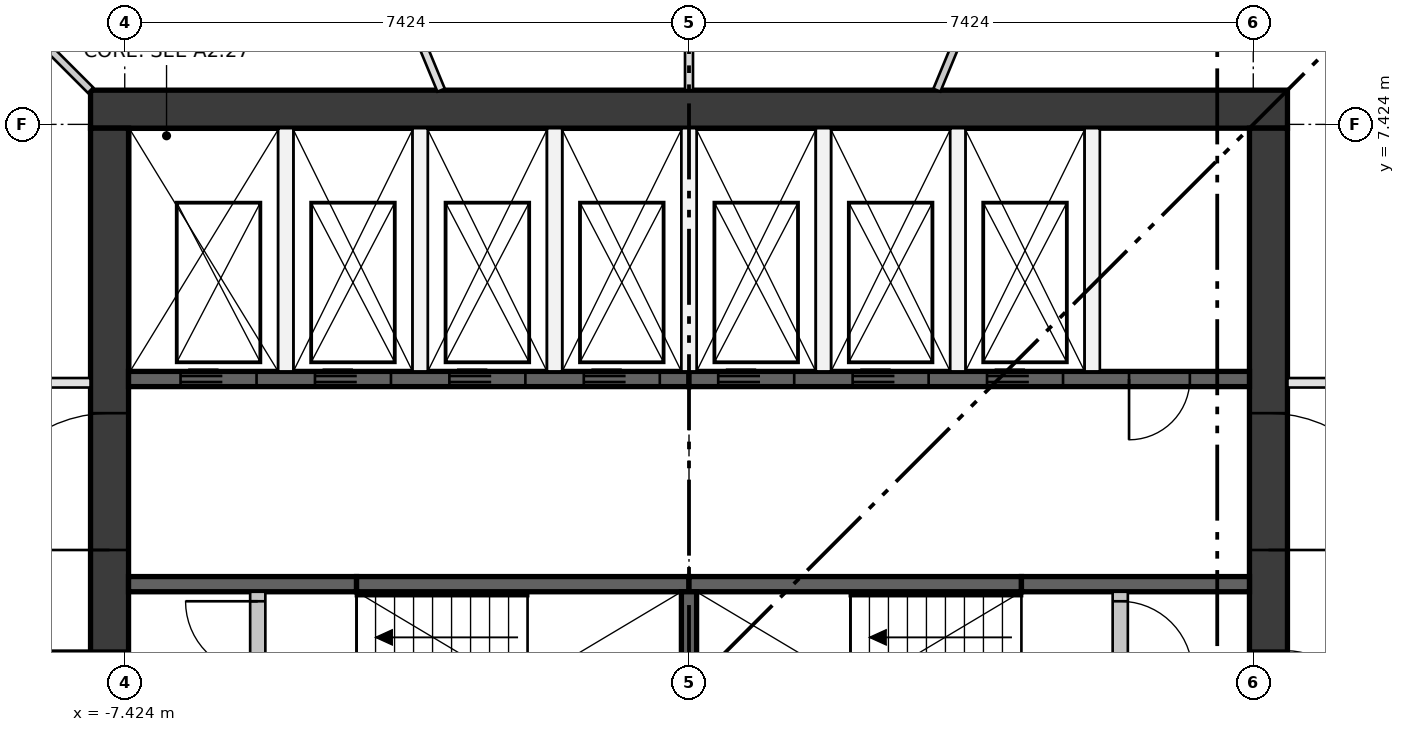
"""IFC4 building model, lengths in metres.
Left out: names, types, materials, properties, quantities, classifications, styles, units other than length and angle.
Written with IfcOpenShell. Run it as: python <this file> out.ifc"""

import sys

from ifc_helpers import new_model, si_unit, direction, frame, frame_2d, origin, place, context, subcontext, project, spatial, rectangle, extrude, element, fill, save


model = new_model("IFC4")
c1 = context("Model", 3, precision=1e-05, world=origin(), true_north=direction((0.0, 1.0)))
c2 = subcontext(c1, "Body", "Model", "MODEL_VIEW")
j1 = project(units=[si_unit("LENGTHUNIT", "METRE"), si_unit("PLANEANGLEUNIT", "RADIAN")], contexts=[c1])
p1 = place(None, origin())
s1 = spatial("IfcSite", under=j1, at=p1, CompositionType="ELEMENT")
p2 = place(p1, origin())
s2 = spatial("IfcBuilding", under=s1, at=p2, CompositionType="ELEMENT")
p3 = place(p2, frame((0.0, 0.0, 170.9)))
s3 = spatial("IfcBuildingStorey", under=s2, at=p3, CompositionType="ELEMENT", Elevation=170.9)
p4 = place(p3, frame((-7.874, 7.624, 0.0), z_axis=(0.0, 0.0, 1.0), x_axis=(1.0, 0.0, 0.0)))
e1 = element("IfcWall", 1, at=p4, inside=s3, PredefinedType="SHEAR", context=c2, shape_type="SweptSolid", body=[
    extrude(rectangle(XDim=15.748, YDim=0.5, at=frame_2d((7.874, 0.0))), origin(), (0.0, 0.0, 1.0), 3.35),
])
p5 = place(p3, frame((-7.624, -7.374, 0.0), z_axis=(0.0, 0.0, 1.0), x_axis=(0.0, 1.0, 0.0)))
e2 = element("IfcWall", 2, at=p5, inside=s3, PredefinedType="SHEAR", context=c2, shape_type="SweptSolid", body=[
    extrude(rectangle(XDim=14.748, YDim=0.5, at=frame_2d((7.374, 0.0))), origin(), (0.0, 0.0, 1.0), 3.35),
])
p6 = place(p5, frame((6.874, 0.0, 0.0)))
e3 = element("IfcOpeningElement", 3, at=p6, cuts=e2, PredefinedType="OPENING", context=c2, shape_type="SweptSolid", body=[
    extrude(rectangle(XDim=1.0, YDim=2.1, at=frame_2d((0.5, 1.05))), frame((0.0, 0.26, 0.0), z_axis=(0.0, -1.0, 0.0), x_axis=(1.0, 0.0, 0.0)), (0.0, 0.0, 1.0), 0.52),
])
p7 = place(p5, frame((3.75, 0.0, 0.0)))
e4 = element("IfcOpeningElement", 4, at=p7, cuts=e2, PredefinedType="OPENING", context=c2, shape_type="SweptSolid", body=[
    extrude(rectangle(XDim=1.8, YDim=2.1, at=frame_2d((0.9, 1.05))), frame((0.0, 0.26, 0.0), z_axis=(0.0, -1.0, 0.0), x_axis=(1.0, 0.0, 0.0)), (0.0, 0.0, 1.0), 0.52),
])
p8 = place(p5, frame((9.198, 0.0, 0.0)))
e5 = element("IfcOpeningElement", 5, at=p8, cuts=e2, PredefinedType="OPENING", context=c2, shape_type="SweptSolid", body=[
    extrude(rectangle(XDim=1.8, YDim=2.1, at=frame_2d((0.9, 1.05))), frame((0.0, 0.26, 0.0), z_axis=(0.0, -1.0, 0.0), x_axis=(1.0, 0.0, 0.0)), (0.0, 0.0, 1.0), 0.52),
])
p9 = place(p3, frame((7.624, -7.374, 0.0), z_axis=(0.0, 0.0, 1.0), x_axis=(0.0, 1.0, 0.0)))
e6 = element("IfcWall", 6, at=p9, inside=s3, PredefinedType="SHEAR", context=c2, shape_type="SweptSolid", body=[
    extrude(rectangle(XDim=14.748, YDim=0.5, at=frame_2d((7.374, 0.0))), origin(), (0.0, 0.0, 1.0), 3.35),
])
p10 = place(p9, frame((6.874, 0.0, 0.0)))
e7 = element("IfcOpeningElement", 7, at=p10, cuts=e6, PredefinedType="OPENING", context=c2, shape_type="SweptSolid", body=[
    extrude(rectangle(XDim=1.0, YDim=2.1, at=frame_2d((0.5, 1.05))), frame((0.0, 0.26, 0.0), z_axis=(0.0, -1.0, 0.0), x_axis=(1.0, 0.0, 0.0)), (0.0, 0.0, 1.0), 0.52),
])
p11 = place(p9, frame((3.75, 0.0, 0.0)))
e8 = element("IfcOpeningElement", 8, at=p11, cuts=e6, PredefinedType="OPENING", context=c2, shape_type="SweptSolid", body=[
    extrude(rectangle(XDim=1.8, YDim=2.1, at=frame_2d((0.9, 1.05))), frame((0.0, 0.26, 0.0), z_axis=(0.0, -1.0, 0.0), x_axis=(1.0, 0.0, 0.0)), (0.0, 0.0, 1.0), 0.52),
])
p12 = place(p9, frame((9.198, 0.0, 0.0)))
e9 = element("IfcOpeningElement", 9, at=p12, cuts=e6, PredefinedType="OPENING", context=c2, shape_type="SweptSolid", body=[
    extrude(rectangle(XDim=1.8, YDim=2.1, at=frame_2d((0.9, 1.05))), frame((0.0, 0.26, 0.0), z_axis=(0.0, -1.0, 0.0), x_axis=(1.0, 0.0, 0.0)), (0.0, 0.0, 1.0), 0.52),
])
p13 = place(p3, frame((-7.374, 4.074, 0.0), z_axis=(0.0, 0.0, 1.0), x_axis=(1.0, 0.0, 0.0)))
e10 = element("IfcWall", 10, at=p13, inside=s3, PredefinedType="SHEAR", context=c2, shape_type="SweptSolid", body=[
    extrude(rectangle(XDim=7.374, YDim=0.2, at=frame_2d((3.687, 0.0))), origin(), (0.0, 0.0, 1.0), 3.0),
])
p14 = place(p13, frame((0.684, 0.0, 0.0)))
e11 = element("IfcOpeningElement", 11, at=p14, cuts=e10, PredefinedType="OPENING", context=c2, shape_type="SweptSolid", body=[
    extrude(rectangle(XDim=1.0, YDim=2.1, at=frame_2d((0.5, 1.05))), frame((0.0, 0.11, 0.0), z_axis=(0.0, -1.0, 0.0), x_axis=(1.0, 0.0, 0.0)), (0.0, 0.0, 1.0), 0.22),
])
p15 = place(p13, frame((2.453, 0.0, 0.0)))
e12 = element("IfcOpeningElement", 12, at=p15, cuts=e10, PredefinedType="OPENING", context=c2, shape_type="SweptSolid", body=[
    extrude(rectangle(XDim=1.0, YDim=2.1, at=frame_2d((0.5, 1.05))), frame((0.0, 0.11, 0.0), z_axis=(0.0, -1.0, 0.0), x_axis=(1.0, 0.0, 0.0)), (0.0, 0.0, 1.0), 0.22),
])
p16 = place(p13, frame((4.221, 0.0, 0.0)))
e13 = element("IfcOpeningElement", 13, at=p16, cuts=e10, PredefinedType="OPENING", context=c2, shape_type="SweptSolid", body=[
    extrude(rectangle(XDim=1.0, YDim=2.1, at=frame_2d((0.5, 1.05))), frame((0.0, 0.11, 0.0), z_axis=(0.0, -1.0, 0.0), x_axis=(1.0, 0.0, 0.0)), (0.0, 0.0, 1.0), 0.22),
])
p17 = place(p13, frame((5.99, 0.0, 0.0)))
e14 = element("IfcOpeningElement", 14, at=p17, cuts=e10, PredefinedType="OPENING", context=c2, shape_type="SweptSolid", body=[
    extrude(rectangle(XDim=1.0, YDim=2.1, at=frame_2d((0.5, 1.05))), frame((0.0, 0.11, 0.0), z_axis=(0.0, -1.0, 0.0), x_axis=(1.0, 0.0, 0.0)), (0.0, 0.0, 1.0), 0.22),
])
p18 = place(p3, frame((0.0, 4.074, 0.0), z_axis=(0.0, 0.0, 1.0), x_axis=(1.0, 0.0, 0.0)))
e15 = element("IfcWall", 15, at=p18, inside=s3, PredefinedType="SHEAR", context=c2, shape_type="SweptSolid", body=[
    extrude(rectangle(XDim=7.374, YDim=0.2, at=frame_2d((3.687, 0.0))), origin(), (0.0, 0.0, 1.0), 3.0),
])
p19 = place(p18, frame((0.384, 0.0, 0.0)))
e16 = element("IfcOpeningElement", 16, at=p19, cuts=e15, PredefinedType="OPENING", context=c2, shape_type="SweptSolid", body=[
    extrude(rectangle(XDim=1.0, YDim=2.1, at=frame_2d((0.5, 1.05))), frame((0.0, 0.11, 0.0), z_axis=(0.0, -1.0, 0.0), x_axis=(1.0, 0.0, 0.0)), (0.0, 0.0, 1.0), 0.22),
])
p20 = place(p18, frame((2.153, 0.0, 0.0)))
e17 = element("IfcOpeningElement", 17, at=p20, cuts=e15, PredefinedType="OPENING", context=c2, shape_type="SweptSolid", body=[
    extrude(rectangle(XDim=1.0, YDim=2.1, at=frame_2d((0.5, 1.05))), frame((0.0, 0.11, 0.0), z_axis=(0.0, -1.0, 0.0), x_axis=(1.0, 0.0, 0.0)), (0.0, 0.0, 1.0), 0.22),
])
p21 = place(p18, frame((3.921, 0.0, 0.0)))
e18 = element("IfcOpeningElement", 18, at=p21, cuts=e15, PredefinedType="OPENING", context=c2, shape_type="SweptSolid", body=[
    extrude(rectangle(XDim=1.0, YDim=2.1, at=frame_2d((0.5, 1.05))), frame((0.0, 0.11, 0.0), z_axis=(0.0, -1.0, 0.0), x_axis=(1.0, 0.0, 0.0)), (0.0, 0.0, 1.0), 0.22),
])
p22 = place(p18, frame((5.79, 0.0, 0.0)))
e19 = element("IfcOpeningElement", 19, at=p22, cuts=e15, PredefinedType="OPENING", context=c2, shape_type="SweptSolid", body=[
    extrude(rectangle(XDim=0.8, YDim=2.1, at=frame_2d((0.4, 1.05))), frame((0.0, 0.11, 0.0), z_axis=(0.0, -1.0, 0.0), x_axis=(1.0, 0.0, 0.0)), (0.0, 0.0, 1.0), 0.22),
])
p23 = place(p3, frame((-7.374, 1.375, 0.0), z_axis=(0.0, 0.0, 1.0), x_axis=(1.0, 0.0, 0.0)))
e20 = element("IfcWall", 20, at=p23, inside=s3, PredefinedType="SHEAR", context=c2, shape_type="SweptSolid", body=[
    extrude(rectangle(XDim=3.0, YDim=0.2, at=frame_2d((1.5, 0.0))), origin(), (0.0, 0.0, 1.0), 3.0),
])
for number, where, z_axis, x_axis in (
    (21, (-4.374, 1.375, 0.0), (0.0, 0.0, 1.0), (1.0, 0.0, 0.0)),
    (22, (0.0, 1.375, 0.0), (0.0, 0.0, 1.0), (1.0, 0.0, 0.0)),
):
    element("IfcWall", number, at=place(p3, frame(where, z_axis=z_axis, x_axis=x_axis)), inside=s3, PredefinedType="SHEAR", context=c2, shape_type="SweptSolid", body=[
        extrude(rectangle(XDim=4.374, YDim=0.2, at=frame_2d((2.187, 0.0))), origin(), (0.0, 0.0, 1.0), 3.0),
    ])
p24 = place(p3, frame((4.374, 1.375, 0.0), z_axis=(0.0, 0.0, 1.0), x_axis=(1.0, 0.0, 0.0)))
e23 = element("IfcWall", 23, at=p24, inside=s3, PredefinedType="SHEAR", context=c2, shape_type="SweptSolid", body=[
    extrude(rectangle(XDim=3.0, YDim=0.2, at=frame_2d((1.5, 0.0))), origin(), (0.0, 0.0, 1.0), 3.0),
])
p25 = place(p3, frame((0.0, -1.275, 0.0), z_axis=(0.0, 0.0, 1.0), x_axis=(0.0, 1.0, 0.0)))
e24 = element("IfcWall", 24, at=p25, inside=s3, PredefinedType="SHEAR", context=c2, shape_type="SweptSolid", body=[
    extrude(rectangle(XDim=2.55, YDim=0.2, at=frame_2d((1.275, 0.0))), origin(), (0.0, 0.0, 1.0), 3.0),
])
for number, where, z_axis, x_axis in (
    (25, (-5.305, 4.174, 0.0), (0.0, 0.0, 1.0), (0.0, 1.0, 0.0)),
    (26, (-3.537, 4.174, 0.0), (0.0, 0.0, 1.0), (0.0, 1.0, 0.0)),
    (27, (-1.769, 4.174, 0.0), (0.0, 0.0, 1.0), (0.0, 1.0, 0.0)),
    (28, (0.0, 4.174, 0.0), (0.0, 0.0, 1.0), (0.0, 1.0, 0.0)),
    (29, (1.769, 4.174, 0.0), (0.0, 0.0, 1.0), (0.0, 1.0, 0.0)),
    (30, (3.537, 4.174, 0.0), (0.0, 0.0, 1.0), (0.0, 1.0, 0.0)),
    (31, (5.305, 4.174, 0.0), (0.0, 0.0, 1.0), (0.0, 1.0, 0.0)),
):
    element("IfcWall", number, at=place(p3, frame(where, z_axis=z_axis, x_axis=x_axis)), inside=s3, PredefinedType="PARTITIONING", context=c2, shape_type="SweptSolid", body=[
        extrude(rectangle(XDim=3.2, YDim=0.2, at=frame_2d((1.6, 0.0))), origin(), (0.0, 0.0, 1.0), 3.0),
    ])
p26 = place(p3, frame((-5.674, -1.275, 0.0), z_axis=(0.0, 0.0, 1.0), x_axis=(0.0, 1.0, 0.0)))
e32 = element("IfcWall", 32, at=p26, inside=s3, PredefinedType="PARTITIONING", context=c2, shape_type="SweptSolid", body=[
    extrude(rectangle(XDim=2.55, YDim=0.2, at=frame_2d((1.275, 0.0))), origin(), (0.0, 0.0, 1.0), 3.0),
])
p27 = place(p26, frame((0.125, 0.0, 0.0)))
e33 = element("IfcOpeningElement", 33, at=p27, cuts=e32, PredefinedType="OPENING", context=c2, shape_type="SweptSolid", body=[
    extrude(rectangle(XDim=0.95, YDim=2.1, at=frame_2d((0.475, 1.05))), frame((0.0, 0.11, 0.0), z_axis=(0.0, -1.0, 0.0), x_axis=(1.0, 0.0, 0.0)), (0.0, 0.0, 1.0), 0.22),
])
p28 = place(p26, frame((1.475, 0.0, 0.0)))
e34 = element("IfcOpeningElement", 34, at=p28, cuts=e32, PredefinedType="OPENING", context=c2, shape_type="SweptSolid", body=[
    extrude(rectangle(XDim=0.95, YDim=2.1, at=frame_2d((0.475, 1.05))), frame((0.0, 0.11, 0.0), z_axis=(0.0, -1.0, 0.0), x_axis=(1.0, 0.0, 0.0)), (0.0, 0.0, 1.0), 0.22),
])
p29 = place(p3, frame((5.674, -1.275, 0.0), z_axis=(0.0, 0.0, 1.0), x_axis=(0.0, 1.0, 0.0)))
e35 = element("IfcWall", 35, at=p29, inside=s3, PredefinedType="PARTITIONING", context=c2, shape_type="SweptSolid", body=[
    extrude(rectangle(XDim=2.55, YDim=0.2, at=frame_2d((1.275, 0.0))), origin(), (0.0, 0.0, 1.0), 3.0),
])
p30 = place(p29, frame((0.125, 0.0, 0.0)))
e36 = element("IfcOpeningElement", 36, at=p30, cuts=e35, PredefinedType="OPENING", context=c2, shape_type="SweptSolid", body=[
    extrude(rectangle(XDim=0.95, YDim=2.1, at=frame_2d((0.475, 1.05))), frame((0.0, 0.11, 0.0), z_axis=(0.0, -1.0, 0.0), x_axis=(1.0, 0.0, 0.0)), (0.0, 0.0, 1.0), 0.22),
])
p31 = place(p29, frame((1.475, 0.0, 0.0)))
e37 = element("IfcOpeningElement", 37, at=p31, cuts=e35, PredefinedType="OPENING", context=c2, shape_type="SweptSolid", body=[
    extrude(rectangle(XDim=0.95, YDim=2.1, at=frame_2d((0.475, 1.05))), frame((0.0, 0.11, 0.0), z_axis=(0.0, -1.0, 0.0), x_axis=(1.0, 0.0, 0.0)), (0.0, 0.0, 1.0), 0.22),
])
p32 = place(p3, frame((7.874, 4.024, 0.0), z_axis=(0.0, 0.0, 1.0), x_axis=(1.0, 0.0, 0.0)))
e38 = element("IfcWall", 38, at=p32, inside=s3, PredefinedType="PARTITIONING", context=c2, shape_type="SweptSolid", body=[
    extrude(rectangle(XDim=4.741, YDim=0.125, at=frame_2d((2.37, 0.0))), origin(), (0.0, 0.0, 1.0), 3.0),
])
p33 = place(p32, frame((1.5, 0.0, 0.0)))
e39 = element("IfcOpeningElement", 39, at=p33, cuts=e38, PredefinedType="OPENING", context=c2, shape_type="SweptSolid", body=[
    extrude(rectangle(XDim=1.8, YDim=2.1, at=frame_2d((0.9, 1.05))), frame((0.0, 0.073, 0.0), z_axis=(0.0, -1.0, 0.0), x_axis=(1.0, 0.0, 0.0)), (0.0, 0.0, 1.0), 0.145),
])
p34 = place(p3, frame((-12.404, 4.024, 0.0), z_axis=(0.0, 0.0, 1.0), x_axis=(1.0, 0.0, 0.0)))
e40 = element("IfcWall", 40, at=p34, inside=s3, PredefinedType="PARTITIONING", context=c2, shape_type="SweptSolid", body=[
    extrude(rectangle(XDim=4.53, YDim=0.125, at=frame_2d((2.265, 0.0))), origin(), (0.0, 0.0, 1.0), 3.0),
])
p35 = place(p34, frame((1.8, 0.0, 0.0)))
e41 = element("IfcOpeningElement", 41, at=p35, cuts=e40, PredefinedType="OPENING", context=c2, shape_type="SweptSolid", body=[
    extrude(rectangle(XDim=1.0, YDim=2.1, at=frame_2d((0.5, 1.05))), frame((0.0, 0.073, 0.0), z_axis=(0.0, -1.0, 0.0), x_axis=(1.0, 0.0, 0.0)), (0.0, 0.0, 1.0), 0.145),
])
p36 = place(p3, frame((3.261, 7.874, 0.0), z_axis=(0.0, 0.0, 1.0), x_axis=(0.382690105068, 0.923876768559, 0.0)))
e42 = element("IfcWall", 42, at=p36, inside=s3, PredefinedType="PARTITIONING", context=c2, shape_type="SweptSolid", body=[
    extrude(rectangle(XDim=5.927, YDim=0.1, at=frame_2d((2.964, 0.0))), origin(), (0.0, 0.0, 1.0), 3.0),
])
p37 = place(p36, frame((2.5, 0.0, 0.0)))
e43 = element("IfcOpeningElement", 43, at=p37, cuts=e42, PredefinedType="OPENING", context=c2, shape_type="SweptSolid", body=[
    extrude(rectangle(XDim=1.0, YDim=2.1, at=frame_2d((0.5, 1.05))), frame((0.0, 0.06, 0.0), z_axis=(0.0, -1.0, 0.0), x_axis=(1.0, 0.0, 0.0)), (0.0, 0.0, 1.0), 0.12),
])
p38 = place(p3, frame((0.0, 7.874, 0.0), z_axis=(0.0, 0.0, 1.0), x_axis=(0.0, 1.0, 0.0)))
e44 = element("IfcWall", 44, at=p38, inside=s3, PredefinedType="PARTITIONING", context=c2, shape_type="SweptSolid", body=[
    extrude(rectangle(XDim=6.52, YDim=0.105, at=frame_2d((3.26, 0.0))), origin(), (0.0, 0.0, 1.0), 3.0),
])
p39 = place(p38, frame((2.8, 0.0, 0.0)))
e45 = element("IfcOpeningElement", 45, at=p39, cuts=e44, PredefinedType="OPENING", context=c2, shape_type="SweptSolid", body=[
    extrude(rectangle(XDim=1.0, YDim=2.1, at=frame_2d((0.5, 1.05))), frame((0.0, 0.062, 0.0), z_axis=(0.0, -1.0, 0.0), x_axis=(1.0, 0.0, 0.0)), (0.0, 0.0, 1.0), 0.125),
])
p40 = place(p3, frame((-3.261, 7.874, 0.0), z_axis=(0.0, 0.0, 1.0), x_axis=(-0.382690105068, 0.923876768559, 0.0)))
e46 = element("IfcWall", 46, at=p40, inside=s3, PredefinedType="PARTITIONING", context=c2, shape_type="SweptSolid", body=[
    extrude(rectangle(XDim=5.927, YDim=0.105, at=frame_2d((2.964, 0.0))), origin(), (0.0, 0.0, 1.0), 3.0),
])
p41 = place(p3, frame((-12.459, 12.459, 0.0), z_axis=(0.0, 0.0, 1.0), x_axis=(0.707106781187, -0.707106781187, 0.0)))
e47 = element("IfcWall", 47, at=p41, inside=s3, PredefinedType="PARTITIONING", context=c2, shape_type="SweptSolid", body=[
    extrude(rectangle(XDim=6.484, YDim=0.1, at=frame_2d((3.242, 0.0))), origin(), (0.0, 0.0, 1.0), 3.0),
])
p42 = place(p41, frame((3.0, 0.0, 0.0)))
e48 = element("IfcOpeningElement", 48, at=p42, cuts=e47, PredefinedType="OPENING", context=c2, shape_type="SweptSolid", body=[
    extrude(rectangle(XDim=1.0, YDim=2.1, at=frame_2d((0.5, 1.05))), frame((0.0, 0.06, 0.0), z_axis=(0.0, -1.0, 0.0), x_axis=(1.0, 0.0, 0.0)), (0.0, 0.0, 1.0), 0.12),
])
p43 = place(p14, frame((1.0, 0.0, 0.0), z_axis=(0.0, 0.0, 1.0), x_axis=(-1.0, 0.0, 0.0)))
e49 = element("IfcDoor", 49, at=p43, inside=s3, OperationType="DOUBLE_DOOR_SLIDING", PredefinedType="DOOR", context=c2, shape_type="SweptSolid", body=[
    extrude(rectangle(XDim=1.0, YDim=2.1, at=frame_2d((0.5, 1.05))), frame((0.0, 0.025, 0.0), z_axis=(0.0, -1.0, 0.0), x_axis=(1.0, 0.0, 0.0)), (0.0, 0.0, 1.0), 0.05),
])
fill(e11, e49)
p44 = place(p15, frame((1.0, 0.0, 0.0), z_axis=(0.0, 0.0, 1.0), x_axis=(-1.0, 0.0, 0.0)))
e50 = element("IfcDoor", 50, at=p44, inside=s3, OperationType="DOUBLE_DOOR_SLIDING", PredefinedType="DOOR", context=c2, shape_type="SweptSolid", body=[
    extrude(rectangle(XDim=1.0, YDim=2.1, at=frame_2d((0.5, 1.05))), frame((0.0, 0.025, 0.0), z_axis=(0.0, -1.0, 0.0), x_axis=(1.0, 0.0, 0.0)), (0.0, 0.0, 1.0), 0.05),
])
fill(e12, e50)
p45 = place(p16, frame((1.0, 0.0, 0.0), z_axis=(0.0, 0.0, 1.0), x_axis=(-1.0, 0.0, 0.0)))
e51 = element("IfcDoor", 51, at=p45, inside=s3, OperationType="DOUBLE_DOOR_SLIDING", PredefinedType="DOOR", context=c2, shape_type="SweptSolid", body=[
    extrude(rectangle(XDim=1.0, YDim=2.1, at=frame_2d((0.5, 1.05))), frame((0.0, 0.025, 0.0), z_axis=(0.0, -1.0, 0.0), x_axis=(1.0, 0.0, 0.0)), (0.0, 0.0, 1.0), 0.05),
])
fill(e13, e51)
p46 = place(p17, frame((1.0, 0.0, 0.0), z_axis=(0.0, 0.0, 1.0), x_axis=(-1.0, 0.0, 0.0)))
e52 = element("IfcDoor", 52, at=p46, inside=s3, OperationType="DOUBLE_DOOR_SLIDING", PredefinedType="DOOR", context=c2, shape_type="SweptSolid", body=[
    extrude(rectangle(XDim=1.0, YDim=2.1, at=frame_2d((0.5, 1.05))), frame((0.0, 0.025, 0.0), z_axis=(0.0, -1.0, 0.0), x_axis=(1.0, 0.0, 0.0)), (0.0, 0.0, 1.0), 0.05),
])
fill(e14, e52)
p47 = place(p19, frame((1.0, 0.0, 0.0), z_axis=(0.0, 0.0, 1.0), x_axis=(-1.0, 0.0, 0.0)))
e53 = element("IfcDoor", 53, at=p47, inside=s3, OperationType="DOUBLE_DOOR_SLIDING", PredefinedType="DOOR", context=c2, shape_type="SweptSolid", body=[
    extrude(rectangle(XDim=1.0, YDim=2.1, at=frame_2d((0.5, 1.05))), frame((0.0, 0.025, 0.0), z_axis=(0.0, -1.0, 0.0), x_axis=(1.0, 0.0, 0.0)), (0.0, 0.0, 1.0), 0.05),
])
fill(e16, e53)
p48 = place(p20, frame((1.0, 0.0, 0.0), z_axis=(0.0, 0.0, 1.0), x_axis=(-1.0, 0.0, 0.0)))
e54 = element("IfcDoor", 54, at=p48, inside=s3, OperationType="DOUBLE_DOOR_SLIDING", PredefinedType="DOOR", context=c2, shape_type="SweptSolid", body=[
    extrude(rectangle(XDim=1.0, YDim=2.1, at=frame_2d((0.5, 1.05))), frame((0.0, 0.025, 0.0), z_axis=(0.0, -1.0, 0.0), x_axis=(1.0, 0.0, 0.0)), (0.0, 0.0, 1.0), 0.05),
])
fill(e17, e54)
p49 = place(p21, frame((1.0, 0.0, 0.0), z_axis=(0.0, 0.0, 1.0), x_axis=(-1.0, 0.0, 0.0)))
e55 = element("IfcDoor", 55, at=p49, inside=s3, OperationType="DOUBLE_DOOR_SLIDING", PredefinedType="DOOR", context=c2, shape_type="SweptSolid", body=[
    extrude(rectangle(XDim=1.0, YDim=2.1, at=frame_2d((0.5, 1.05))), frame((0.0, 0.025, 0.0), z_axis=(0.0, -1.0, 0.0), x_axis=(1.0, 0.0, 0.0)), (0.0, 0.0, 1.0), 0.05),
])
fill(e18, e55)
p50 = place(p28, origin())
e56 = element("IfcDoor", 56, at=p50, inside=s3, OperationType="SINGLE_SWING_RIGHT", PredefinedType="DOOR", context=c2, shape_type="SweptSolid", body=[
    extrude(rectangle(XDim=0.95, YDim=2.1, at=frame_2d((0.475, 1.05))), frame((0.0, 0.025, 0.0), z_axis=(0.0, -1.0, 0.0), x_axis=(1.0, 0.0, 0.0)), (0.0, 0.0, 1.0), 0.05),
])
fill(e34, e56)
p51 = place(p31, frame((0.95, 0.0, 0.0), z_axis=(0.0, 0.0, 1.0), x_axis=(-1.0, 0.0, 0.0)))
e57 = element("IfcDoor", 57, at=p51, inside=s3, OperationType="SINGLE_SWING_LEFT", PredefinedType="DOOR", context=c2, shape_type="SweptSolid", body=[
    extrude(rectangle(XDim=0.95, YDim=2.1, at=frame_2d((0.475, 1.05))), frame((0.0, 0.025, 0.0), z_axis=(0.0, -1.0, 0.0), x_axis=(1.0, 0.0, 0.0)), (0.0, 0.0, 1.0), 0.05),
])
fill(e37, e57)
p52 = place(p22, frame((0.8, 0.0, 0.0), z_axis=(0.0, 0.0, 1.0), x_axis=(-1.0, 0.0, 0.0)))
e58 = element("IfcDoor", 58, at=p52, inside=s3, OperationType="SINGLE_SWING_LEFT", PredefinedType="DOOR", context=c2, shape_type="SweptSolid", body=[
    extrude(rectangle(XDim=0.8, YDim=2.1, at=frame_2d((0.4, 1.05))), frame((0.0, 0.025, 0.0), z_axis=(0.0, -1.0, 0.0), x_axis=(1.0, 0.0, 0.0)), (0.0, 0.0, 1.0), 0.05),
])
fill(e19, e58)
p53 = place(p6, origin())
e59 = element("IfcDoor", 59, at=p53, inside=s3, OperationType="SINGLE_SWING_RIGHT", PredefinedType="DOOR", context=c2, shape_type="SweptSolid", body=[
    extrude(rectangle(XDim=1.0, YDim=2.1, at=frame_2d((0.5, 1.05))), frame((0.0, 0.25, 0.0), z_axis=(0.0, -1.0, 0.0), x_axis=(1.0, 0.0, 0.0)), (0.0, 0.0, 1.0), 0.05),
])
fill(e3, e59)
p54 = place(p8, origin())
e60 = element("IfcDoor", 60, at=p54, inside=s3, OperationType="DOUBLE_DOOR_SINGLE_SWING", PredefinedType="DOOR", context=c2, shape_type="SweptSolid", body=[
    extrude(rectangle(XDim=1.8, YDim=2.1, at=frame_2d((0.9, 1.05))), frame((0.0, 0.025, 0.0), z_axis=(0.0, -1.0, 0.0), x_axis=(1.0, 0.0, 0.0)), (0.0, 0.0, 1.0), 0.05),
])
fill(e5, e60)
p55 = place(p10, frame((1.0, 0.0, 0.0), z_axis=(0.0, 0.0, 1.0), x_axis=(-1.0, 0.0, 0.0)))
e61 = element("IfcDoor", 61, at=p55, inside=s3, OperationType="SINGLE_SWING_LEFT", PredefinedType="DOOR", context=c2, shape_type="SweptSolid", body=[
    extrude(rectangle(XDim=1.0, YDim=2.1, at=frame_2d((0.5, 1.05))), frame((0.0, 0.25, 0.0), z_axis=(0.0, -1.0, 0.0), x_axis=(1.0, 0.0, 0.0)), (0.0, 0.0, 1.0), 0.05),
])
fill(e7, e61)
p56 = place(p12, frame((1.8, 0.0, 0.0), z_axis=(0.0, 0.0, 1.0), x_axis=(-1.0, 0.0, 0.0)))
e62 = element("IfcDoor", 62, at=p56, inside=s3, OperationType="DOUBLE_DOOR_SINGLE_SWING", PredefinedType="DOOR", context=c2, shape_type="SweptSolid", body=[
    extrude(rectangle(XDim=1.8, YDim=2.1, at=frame_2d((0.9, 1.05))), frame((0.0, 0.025, 0.0), z_axis=(0.0, -1.0, 0.0), x_axis=(1.0, 0.0, 0.0)), (0.0, 0.0, 1.0), 0.05),
])
fill(e9, e62)
save(model, sys.argv[1])
